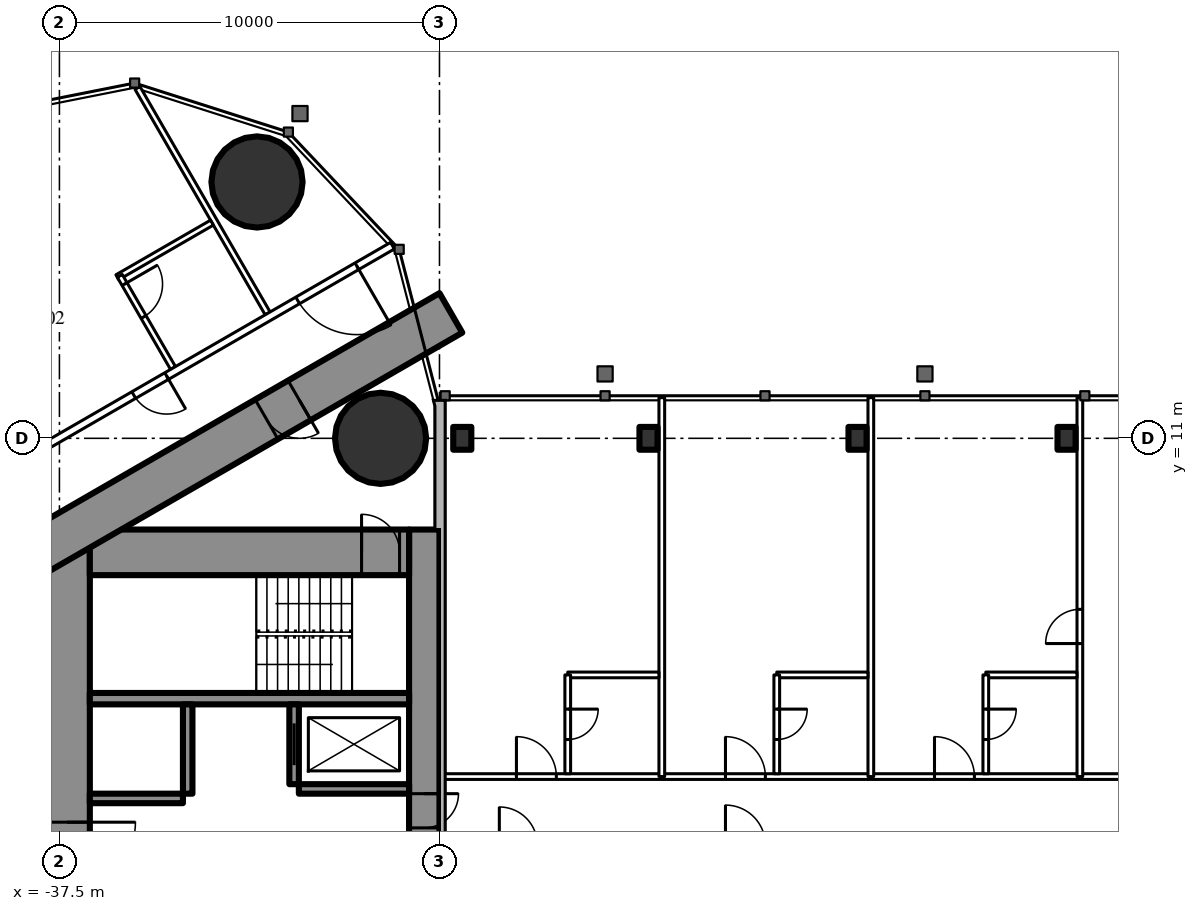
"""IFC4 building model, lengths in metres.
Left out: names, types, materials, properties, quantities, classifications, styles, units other than length and angle.
Written with IfcOpenShell. Run it as: python <this file> out.ifc"""

import sys

from ifc_helpers import new_model, si_unit, direction, frame, frame_2d, origin, origin_2d, place, context, subcontext, project, spatial, rectangle, circle, i_section, extrude, element, fill, save


model = new_model("IFC4")
c1 = context("Model", 3, precision=1e-05, world=origin(), true_north=direction((0.0, 1.0)))
c2 = subcontext(c1, "Body", "Model", "MODEL_VIEW")
j1 = project(units=[si_unit("LENGTHUNIT", "METRE"), si_unit("PLANEANGLEUNIT", "RADIAN")], contexts=[c1])
p1 = place(None, origin())
s1 = spatial("IfcSite", under=j1, at=p1, CompositionType="ELEMENT")
p2 = place(p1, origin())
s2 = spatial("IfcBuilding", under=s1, at=p2, CompositionType="ELEMENT")
p3 = place(p2, frame((0.0, 0.0, 229.7)))
s3 = spatial("IfcBuildingStorey", under=s2, at=p3, CompositionType="ELEMENT", Elevation=229.7)
for number, where, z_axis, x_axis in (
    (1, (-32.301, 17.745, 0.0), (0.0, 0.0, 1.0), (1.0, 0.0, 0.0)),
    (2, (-29.05, 11.0, 0.0), (0.0, 0.0, 1.0), (1.0, 0.0, 0.0)),
):
    element("IfcColumn", number, at=place(p3, frame(where, z_axis=z_axis, x_axis=x_axis)), inside=s3, PredefinedType="COLUMN", context=c2, shape_type="SweptSolid", body=[
        extrude(circle(Radius=1.2, at=origin_2d()), origin(), (0.0, 0.0, 1.0), 3.6),
    ])
p4 = place(p3, frame((-27.9, 8.6, 0.0), z_axis=(0.0, 0.0, 1.0), x_axis=(0.0, -1.0, 0.0)))
e3 = element("IfcWall", 3, at=p4, inside=s3, PredefinedType="SHEAR", context=c2, shape_type="SweptSolid", body=[
    extrude(rectangle(XDim=17.2, YDim=0.8, at=frame_2d((8.6, 0.0))), origin(), (0.0, 0.0, 1.0), 3.6),
])
p5 = place(p4, frame((6.95, 0.0, 0.0)))
e4 = element("IfcOpeningElement", 4, at=p5, cuts=e3, PredefinedType="OPENING", context=c2, shape_type="SweptSolid", body=[
    extrude(rectangle(XDim=0.9, YDim=2.2, at=frame_2d((0.45, 1.1))), frame((0.0, 0.41, 0.0), z_axis=(0.0, -1.0, 0.0), x_axis=(1.0, 0.0, 0.0)), (0.0, 0.0, 1.0), 0.82),
])
p6 = place(p3, frame((-37.3, 8.6, 0.0), z_axis=(0.0, 0.0, 1.0), x_axis=(0.0, -1.0, 0.0)))
e5 = element("IfcWall", 5, at=p6, inside=s3, PredefinedType="SHEAR", context=c2, shape_type="SweptSolid", body=[
    extrude(rectangle(XDim=17.2, YDim=1.2, at=frame_2d((8.6, 0.0))), origin(), (0.0, 0.0, 1.0), 3.6),
])
p7 = place(p6, frame((7.7, 0.0, 0.0)))
e6 = element("IfcOpeningElement", 6, at=p7, cuts=e5, PredefinedType="OPENING", context=c2, shape_type="SweptSolid", body=[
    extrude(rectangle(XDim=1.8, YDim=2.2, at=frame_2d((0.9, 1.1))), frame((0.0, 0.61, 0.0), z_axis=(0.0, -1.0, 0.0), x_axis=(1.0, 0.0, 0.0)), (0.0, 0.0, 1.0), 1.22),
])
p8 = place(p3, frame((-28.3, 8.0, 0.0), z_axis=(0.0, 0.0, 1.0), x_axis=(-1.0, 0.0, 0.0)))
e7 = element("IfcWall", 7, at=p8, inside=s3, PredefinedType="SHEAR", context=c2, shape_type="SweptSolid", body=[
    extrude(rectangle(XDim=8.4, YDim=1.2, at=frame_2d((4.2, 0.0))), origin(), (0.0, 0.0, 1.0), 3.6),
])
p9 = place(p8, frame((0.25, 0.0, 0.0)))
e8 = element("IfcOpeningElement", 8, at=p9, cuts=e7, PredefinedType="OPENING", context=c2, shape_type="SweptSolid", body=[
    extrude(rectangle(XDim=1.0, YDim=2.2, at=frame_2d((0.5, 1.1))), frame((0.0, 0.61, 0.0), z_axis=(0.0, -1.0, 0.0), x_axis=(1.0, 0.0, 0.0)), (0.0, 0.0, 1.0), 1.22),
])
p10 = place(p3, frame((-28.3, 4.15, 0.0), z_axis=(0.0, 0.0, 1.0), x_axis=(-1.0, 0.0, 0.0)))
e9 = element("IfcWall", 9, at=p10, inside=s3, PredefinedType="SHEAR", context=c2, shape_type="SweptSolid", body=[
    extrude(rectangle(XDim=8.4, YDim=0.3, at=frame_2d((4.2, 0.0))), origin(), (0.0, 0.0, 1.0), 3.6),
])
p11 = place(p3, frame((-31.325, 4.0, 0.0), z_axis=(0.0, 0.0, 1.0), x_axis=(0.0, -1.0, 0.0)))
e10 = element("IfcWall", 10, at=p11, inside=s3, PredefinedType="SHEAR", context=c2, shape_type="SweptSolid", body=[
    extrude(rectangle(XDim=2.1, YDim=0.25, at=frame_2d((1.05, 0.0))), origin(), (0.0, 0.0, 1.0), 3.6),
])
p12 = place(p11, frame((0.5, 0.0, 0.0)))
e11 = element("IfcOpeningElement", 11, at=p12, cuts=e10, PredefinedType="OPENING", context=c2, shape_type="SweptSolid", body=[
    extrude(rectangle(XDim=1.1, YDim=2.2, at=frame_2d((0.55, 1.1))), frame((0.0, 0.135, 0.0), z_axis=(0.0, -1.0, 0.0), x_axis=(1.0, 0.0, 0.0)), (0.0, 0.0, 1.0), 0.27),
])
p13 = place(p3, frame((-34.125, 4.0, 0.0), z_axis=(0.0, 0.0, 1.0), x_axis=(0.0, -1.0, 0.0)))
e12 = element("IfcWall", 12, at=p13, inside=s3, PredefinedType="SHEAR", context=c2, shape_type="SweptSolid", body=[
    extrude(rectangle(XDim=2.35, YDim=0.25, at=frame_2d((1.175, 0.0))), origin(), (0.0, 0.0, 1.0), 3.6),
])
p14 = place(p3, frame((-28.3, 1.775, 0.0), z_axis=(0.0, 0.0, 1.0), x_axis=(-1.0, 0.0, 0.0)))
e13 = element("IfcWall", 13, at=p14, inside=s3, PredefinedType="SHEAR", context=c2, shape_type="SweptSolid", body=[
    extrude(rectangle(XDim=2.9, YDim=0.25, at=frame_2d((1.45, 0.0))), origin(), (0.0, 0.0, 1.0), 3.6),
])
p15 = place(p3, frame((-34.25, 1.525, 0.0), z_axis=(0.0, 0.0, 1.0), x_axis=(-1.0, 0.0, 0.0)))
e14 = element("IfcWall", 14, at=p15, inside=s3, PredefinedType="SHEAR", context=c2, shape_type="SweptSolid", body=[
    extrude(rectangle(XDim=2.45, YDim=0.25, at=frame_2d((1.225, 0.0))), origin(), (0.0, 0.0, 1.0), 3.6),
])
p16 = place(p3, frame((-27.2, 14.3, 0.0), z_axis=(0.0, 0.0, 1.0), x_axis=(-0.866026593062, -0.499997940104, 0.0)))
e15 = element("IfcWall", 15, at=p16, inside=s3, PredefinedType="SHEAR", context=c2, shape_type="SweptSolid", body=[
    extrude(rectangle(XDim=28.946, YDim=1.2, at=frame_2d((14.473, 0.0))), origin(), (0.0, 0.0, 1.0), 3.6),
])
p17 = place(p16, frame((4.6, 0.0, 0.0)))
e16 = element("IfcOpeningElement", 16, at=p17, cuts=e15, PredefinedType="OPENING", context=c2, shape_type="SweptSolid", body=[
    extrude(rectangle(XDim=1.0, YDim=2.2, at=frame_2d((0.5, 1.1))), frame((0.0, 0.61, 0.0), z_axis=(0.0, -1.0, 0.0), x_axis=(1.0, 0.0, 0.0)), (0.0, 0.0, 1.0), 1.22),
])
p18 = place(p16, frame((13.395, 0.0, 0.0)))
e17 = element("IfcOpeningElement", 17, at=p18, cuts=e15, PredefinedType="OPENING", context=c2, shape_type="SweptSolid", body=[
    extrude(rectangle(XDim=1.8, YDim=2.2, at=frame_2d((0.9, 1.1))), frame((0.0, 0.61, 0.0), z_axis=(0.0, -1.0, 0.0), x_axis=(1.0, 0.0, 0.0)), (0.0, 0.0, 1.0), 1.22),
])
for number, where, z_axis, x_axis in (
    (18, (-26.9, 11.0, 0.0), (0.0, 0.0, 1.0), (1.0, 0.0, 0.0)),
    (19, (-22.0, 11.0, 0.0), (0.0, 0.0, 1.0), (1.0, 0.0, 0.0)),
    (20, (-16.5, 11.0, 0.0), (0.0, 0.0, 1.0), (1.0, 0.0, 0.0)),
    (21, (-11.0, 11.0, 0.0), (0.0, 0.0, 1.0), (1.0, 0.0, 0.0)),
):
    element("IfcColumn", number, at=place(p3, frame(where, z_axis=z_axis, x_axis=x_axis)), inside=s3, PredefinedType="COLUMN", context=c2, shape_type="SweptSolid", body=[
        extrude(i_section(OverallWidth=0.476, OverallDepth=0.6, WebThickness=0.1, FlangeThickness=0.14, FilletRadius=0.02, at=origin_2d()), origin(), (0.0, 0.0, 1.0), 3.6),
    ])
p19 = place(p3, frame((-32.022, 14.287, 0.0), z_axis=(0.0, 0.0, 1.0), x_axis=(-0.50000019414, 0.866025291697, 0.0)))
e22 = element("IfcWall", 22, at=p19, inside=s3, PredefinedType="PARTITIONING", context=c2, shape_type="SweptSolid", body=[
    extrude(rectangle(XDim=6.848, YDim=0.15, at=frame_2d((3.424, 0.0))), origin(), (0.0, 0.0, 1.0), 3.35),
])
p20 = place(p3, frame((-33.487, 16.675, 0.0), z_axis=(0.0, 0.0, 1.0), x_axis=(-0.866039941686, -0.499974818771, 0.0)))
e23 = element("IfcWall", 23, at=p20, inside=s3, PredefinedType="PARTITIONING", context=c2, shape_type="SweptSolid", body=[
    extrude(rectangle(XDim=2.875, YDim=0.15, at=frame_2d((1.438, 0.0))), origin(), (0.0, 0.0, 1.0), 3.35),
])
p21 = place(p3, frame((-34.511, 12.85, 0.0), z_axis=(0.0, 0.0, 1.0), x_axis=(-0.500011755427, 0.866018616679, 0.0)))
e24 = element("IfcWall", 24, at=p21, inside=s3, PredefinedType="PARTITIONING", context=c2, shape_type="SweptSolid", body=[
    extrude(rectangle(XDim=2.8, YDim=0.15, at=frame_2d((1.4, 0.0))), origin(), (0.0, 0.0, 1.0), 3.35),
])
p22 = place(p21, frame((1.55, 0.0, 0.0)))
e25 = element("IfcOpeningElement", 25, at=p22, cuts=e24, PredefinedType="OPENING", context=c2, shape_type="SweptSolid", body=[
    extrude(rectangle(XDim=1.0, YDim=2.2, at=frame_2d((0.5, 1.1))), frame((0.0, 0.085, 0.0), z_axis=(0.0, -1.0, 0.0), x_axis=(1.0, 0.0, 0.0)), (0.0, 0.0, 1.0), 0.17),
])
p23 = place(p3, frame((-28.737, 16.068, 0.0), z_axis=(0.0, 0.0, 1.0), x_axis=(-0.866023901326, -0.500002602325, 0.0)))
e26 = element("IfcWall", 26, at=p23, inside=s3, PredefinedType="PARTITIONING", context=c2, shape_type="SweptSolid", body=[
    extrude(rectangle(XDim=20.192, YDim=0.2, at=frame_2d((10.096, 0.0))), origin(), (0.0, 0.0, 1.0), 3.35),
])
p24 = place(p23, frame((1.08, 0.0, 0.0)))
e27 = element("IfcOpeningElement", 27, at=p24, cuts=e26, PredefinedType="OPENING", context=c2, shape_type="SweptSolid", body=[
    extrude(rectangle(XDim=1.8, YDim=2.04, at=frame_2d((0.9, 1.02))), frame((0.0, 0.11, 0.0), z_axis=(0.0, -1.0, 0.0), x_axis=(1.0, 0.0, 0.0)), (0.0, 0.0, 1.0), 0.22),
])
p25 = place(p23, frame((6.86, 0.0, 0.0)))
e28 = element("IfcOpeningElement", 28, at=p25, cuts=e26, PredefinedType="OPENING", context=c2, shape_type="SweptSolid", body=[
    extrude(rectangle(XDim=1.0, YDim=2.2, at=frame_2d((0.5, 1.1))), frame((0.0, 0.11, 0.0), z_axis=(0.0, -1.0, 0.0), x_axis=(1.0, 0.0, 0.0)), (0.0, 0.0, 1.0), 0.22),
])
p26 = place(p23, frame((18.867, 0.0, 0.0)))
e29 = element("IfcOpeningElement", 29, at=p26, cuts=e26, PredefinedType="OPENING", context=c2, shape_type="SweptSolid", body=[
    extrude(rectangle(XDim=0.95, YDim=2.2, at=frame_2d((0.475, 1.1))), frame((0.0, 0.11, 0.0), z_axis=(0.0, -1.0, 0.0), x_axis=(1.0, 0.0, 0.0)), (0.0, 0.0, 1.0), 0.22),
])
p27 = place(p3, frame((-27.5, 2.1, 0.0), z_axis=(0.0, 0.0, 1.0), x_axis=(1.0, 0.0, 0.0)))
e30 = element("IfcWall", 30, at=p27, inside=s3, PredefinedType="PARTITIONING", context=c2, shape_type="SweptSolid", body=[
    extrude(rectangle(XDim=22.35, YDim=0.15, at=frame_2d((11.175, 0.0))), origin(), (0.0, 0.0, 1.0), 3.4),
])
p28 = place(p27, frame((2.025, 0.0, 0.0)))
e31 = element("IfcOpeningElement", 31, at=p28, cuts=e30, PredefinedType="OPENING", context=c2, shape_type="SweptSolid", body=[
    extrude(rectangle(XDim=1.05, YDim=2.4, at=frame_2d((0.525, 1.2))), frame((0.0, 0.085, 0.0), z_axis=(0.0, -1.0, 0.0), x_axis=(1.0, 0.0, 0.0)), (0.0, 0.0, 1.0), 0.17),
])
p29 = place(p27, frame((7.525, 0.0, 0.0)))
e32 = element("IfcOpeningElement", 32, at=p29, cuts=e30, PredefinedType="OPENING", context=c2, shape_type="SweptSolid", body=[
    extrude(rectangle(XDim=1.05, YDim=2.4, at=frame_2d((0.525, 1.2))), frame((0.0, 0.085, 0.0), z_axis=(0.0, -1.0, 0.0), x_axis=(1.0, 0.0, 0.0)), (0.0, 0.0, 1.0), 0.17),
])
p30 = place(p27, frame((13.025, 0.0, 0.0)))
e33 = element("IfcOpeningElement", 33, at=p30, cuts=e30, PredefinedType="OPENING", context=c2, shape_type="SweptSolid", body=[
    extrude(rectangle(XDim=1.05, YDim=2.4, at=frame_2d((0.525, 1.2))), frame((0.0, 0.085, 0.0), z_axis=(0.0, -1.0, 0.0), x_axis=(1.0, 0.0, 0.0)), (0.0, 0.0, 1.0), 0.17),
])
p31 = place(p27, frame((18.525, 0.0, 0.0)))
e34 = element("IfcOpeningElement", 34, at=p31, cuts=e30, PredefinedType="OPENING", context=c2, shape_type="SweptSolid", body=[
    extrude(rectangle(XDim=1.05, YDim=2.4, at=frame_2d((0.525, 1.2))), frame((0.0, 0.085, 0.0), z_axis=(0.0, -1.0, 0.0), x_axis=(1.0, 0.0, 0.0)), (0.0, 0.0, 1.0), 0.17),
])
for number, where, z_axis, x_axis in (
    (35, (-21.65, 2.1, 0.0), (0.0, 0.0, 1.0), (0.0, 1.0, 0.0)),
    (36, (-16.15, 2.1, 0.0), (0.0, 0.0, 1.0), (0.0, 1.0, 0.0)),
):
    element("IfcWall", number, at=place(p3, frame(where, z_axis=z_axis, x_axis=x_axis)), inside=s3, PredefinedType="PARTITIONING", context=c2, shape_type="SweptSolid", body=[
        extrude(rectangle(XDim=9.97, YDim=0.15, at=frame_2d((4.985, 0.0))), origin(), (0.0, 0.0, 1.0), 3.4),
    ])
p32 = place(p3, frame((-10.65, 2.1, 0.0), z_axis=(0.0, 0.0, 1.0), x_axis=(0.0, 1.0, 0.0)))
e37 = element("IfcWall", 37, at=p32, inside=s3, PredefinedType="PARTITIONING", context=c2, shape_type="SweptSolid", body=[
    extrude(rectangle(XDim=9.97, YDim=0.15, at=frame_2d((4.985, 0.0))), origin(), (0.0, 0.0, 1.0), 3.4),
])
p33 = place(p32, frame((3.5, 0.0, 0.0)))
e38 = element("IfcOpeningElement", 38, at=p33, cuts=e37, PredefinedType="OPENING", context=c2, shape_type="SweptSolid", body=[
    extrude(rectangle(XDim=0.9, YDim=2.2, at=frame_2d((0.45, 1.1))), frame((0.0, 0.085, 0.0), z_axis=(0.0, -1.0, 0.0), x_axis=(1.0, 0.0, 0.0)), (0.0, 0.0, 1.0), 0.17),
])
p34 = place(p3, frame((-24.125, 4.775, 0.0), z_axis=(0.0, 0.0, 1.0), x_axis=(1.0, 0.0, 0.0)))
e39 = element("IfcWall", 39, at=p34, inside=s3, PredefinedType="PARTITIONING", context=c2, shape_type="SweptSolid", body=[
    extrude(rectangle(XDim=2.4, YDim=0.15, at=frame_2d((1.2, 0.0))), origin(), (0.0, 0.0, 1.0), 3.4),
])
p35 = place(p3, frame((-24.125, 2.175, 0.0), z_axis=(0.0, 0.0, 1.0), x_axis=(0.0, 1.0, 0.0)))
e40 = element("IfcWall", 40, at=p35, inside=s3, PredefinedType="PARTITIONING", context=c2, shape_type="SweptSolid", body=[
    extrude(rectangle(XDim=2.6, YDim=0.15, at=frame_2d((1.3, 0.0))), origin(), (0.0, 0.0, 1.0), 3.4),
])
p36 = place(p35, frame((0.9, 0.0, 0.0)))
e41 = element("IfcOpeningElement", 41, at=p36, cuts=e40, PredefinedType="OPENING", context=c2, shape_type="SweptSolid", body=[
    extrude(rectangle(XDim=0.8, YDim=2.2, at=frame_2d((0.4, 1.1))), frame((0.0, 0.085, 0.0), z_axis=(0.0, -1.0, 0.0), x_axis=(1.0, 0.0, 0.0)), (0.0, 0.0, 1.0), 0.17),
])
p37 = place(p3, frame((-18.625, 4.775, 0.0), z_axis=(0.0, 0.0, 1.0), x_axis=(1.0, 0.0, 0.0)))
e42 = element("IfcWall", 42, at=p37, inside=s3, PredefinedType="PARTITIONING", context=c2, shape_type="SweptSolid", body=[
    extrude(rectangle(XDim=2.4, YDim=0.15, at=frame_2d((1.2, 0.0))), origin(), (0.0, 0.0, 1.0), 3.4),
])
p38 = place(p3, frame((-18.625, 2.175, 0.0), z_axis=(0.0, 0.0, 1.0), x_axis=(0.0, 1.0, 0.0)))
e43 = element("IfcWall", 43, at=p38, inside=s3, PredefinedType="PARTITIONING", context=c2, shape_type="SweptSolid", body=[
    extrude(rectangle(XDim=2.6, YDim=0.15, at=frame_2d((1.3, 0.0))), origin(), (0.0, 0.0, 1.0), 3.4),
])
p39 = place(p38, frame((0.9, 0.0, 0.0)))
e44 = element("IfcOpeningElement", 44, at=p39, cuts=e43, PredefinedType="OPENING", context=c2, shape_type="SweptSolid", body=[
    extrude(rectangle(XDim=0.8, YDim=2.2, at=frame_2d((0.4, 1.1))), frame((0.0, 0.085, 0.0), z_axis=(0.0, -1.0, 0.0), x_axis=(1.0, 0.0, 0.0)), (0.0, 0.0, 1.0), 0.17),
])
p40 = place(p3, frame((-13.125, 4.775, 0.0), z_axis=(0.0, 0.0, 1.0), x_axis=(1.0, 0.0, 0.0)))
e45 = element("IfcWall", 45, at=p40, inside=s3, PredefinedType="PARTITIONING", context=c2, shape_type="SweptSolid", body=[
    extrude(rectangle(XDim=2.4, YDim=0.15, at=frame_2d((1.2, 0.0))), origin(), (0.0, 0.0, 1.0), 3.4),
])
p41 = place(p3, frame((-13.125, 2.175, 0.0), z_axis=(0.0, 0.0, 1.0), x_axis=(0.0, 1.0, 0.0)))
e46 = element("IfcWall", 46, at=p41, inside=s3, PredefinedType="PARTITIONING", context=c2, shape_type="SweptSolid", body=[
    extrude(rectangle(XDim=2.6, YDim=0.15, at=frame_2d((1.3, 0.0))), origin(), (0.0, 0.0, 1.0), 3.4),
])
p42 = place(p41, frame((0.9, 0.0, 0.0)))
e47 = element("IfcOpeningElement", 47, at=p42, cuts=e46, PredefinedType="OPENING", context=c2, shape_type="SweptSolid", body=[
    extrude(rectangle(XDim=0.8, YDim=2.2, at=frame_2d((0.4, 1.1))), frame((0.0, 0.085, 0.0), z_axis=(0.0, -1.0, 0.0), x_axis=(1.0, 0.0, 0.0)), (0.0, 0.0, 1.0), 0.17),
])
p43 = place(p24, origin())
e48 = element("IfcDoor", 48, at=p43, inside=s3, OperationType="DOUBLE_DOOR_SINGLE_SWING", PredefinedType="DOOR", context=c2, shape_type="SweptSolid", body=[
    extrude(rectangle(XDim=1.8, YDim=2.04, at=frame_2d((0.9, 1.02))), frame((0.0, 0.025, 0.0), z_axis=(0.0, -1.0, 0.0), x_axis=(1.0, 0.0, 0.0)), (0.0, 0.0, 1.0), 0.05),
])
fill(e27, e48)
p44 = place(p22, origin())
e49 = element("IfcDoor", 49, at=p44, inside=s3, OperationType="SINGLE_SWING_RIGHT", PredefinedType="DOOR", context=c2, shape_type="SweptSolid", body=[
    extrude(rectangle(XDim=1.0, YDim=2.2, at=frame_2d((0.5, 1.1))), frame((0.0, 0.025, 0.0), z_axis=(0.0, -1.0, 0.0), x_axis=(1.0, 0.0, 0.0)), (0.0, 0.0, 1.0), 0.05),
])
fill(e25, e49)
p45 = place(p25, origin())
e50 = element("IfcDoor", 50, at=p45, inside=s3, OperationType="SINGLE_SWING_LEFT", PredefinedType="DOOR", context=c2, shape_type="SweptSolid", body=[
    extrude(rectangle(XDim=1.0, YDim=2.2, at=frame_2d((0.5, 1.1))), frame((0.0, 0.025, 0.0), z_axis=(0.0, -1.0, 0.0), x_axis=(1.0, 0.0, 0.0)), (0.0, 0.0, 1.0), 0.05),
])
fill(e28, e50)
p46 = place(p17, origin())
e51 = element("IfcDoor", 51, at=p46, inside=s3, OperationType="SINGLE_SWING_LEFT", PredefinedType="DOOR", context=c2, shape_type="SweptSolid", body=[
    extrude(rectangle(XDim=1.0, YDim=2.2, at=frame_2d((0.5, 1.1))), frame((0.0, 0.025, 0.0), z_axis=(0.0, -1.0, 0.0), x_axis=(1.0, 0.0, 0.0)), (0.0, 0.0, 1.0), 0.05),
])
fill(e16, e51)
p47 = place(p7, origin())
e52 = element("IfcDoor", 52, at=p47, inside=s3, OperationType="DOUBLE_DOOR_SINGLE_SWING", PredefinedType="DOOR", context=c2, shape_type="SweptSolid", body=[
    extrude(rectangle(XDim=1.8, YDim=2.2, at=frame_2d((0.9, 1.1))), frame((0.0, 0.025, 0.0), z_axis=(0.0, -1.0, 0.0), x_axis=(1.0, 0.0, 0.0)), (0.0, 0.0, 1.0), 0.05),
])
fill(e6, e52)
p48 = place(p9, origin())
e53 = element("IfcDoor", 53, at=p48, inside=s3, OperationType="SINGLE_SWING_RIGHT", PredefinedType="DOOR", context=c2, shape_type="SweptSolid", body=[
    extrude(rectangle(XDim=1.0, YDim=2.2, at=frame_2d((0.5, 1.1))), frame((0.0, 0.025, 0.0), z_axis=(0.0, -1.0, 0.0), x_axis=(1.0, 0.0, 0.0)), (0.0, 0.0, 1.0), 0.05),
])
fill(e8, e53)
p49 = place(p5, origin())
e54 = element("IfcDoor", 54, at=p49, inside=s3, OperationType="SINGLE_SWING_LEFT", PredefinedType="DOOR", context=c2, shape_type="SweptSolid", body=[
    extrude(rectangle(XDim=0.9, YDim=2.2, at=frame_2d((0.45, 1.1))), frame((0.0, 0.025, 0.0), z_axis=(0.0, -1.0, 0.0), x_axis=(1.0, 0.0, 0.0)), (0.0, 0.0, 1.0), 0.05),
])
fill(e4, e54)
p50 = place(p36, origin())
e55 = element("IfcDoor", 55, at=p50, inside=s3, OperationType="SINGLE_SWING_RIGHT", PredefinedType="DOOR", context=c2, shape_type="SweptSolid", body=[
    extrude(rectangle(XDim=0.8, YDim=2.2, at=frame_2d((0.4, 1.1))), frame((0.0, 0.025, 0.0), z_axis=(0.0, -1.0, 0.0), x_axis=(1.0, 0.0, 0.0)), (0.0, 0.0, 1.0), 0.05),
])
fill(e41, e55)
p51 = place(p28, origin())
e56 = element("IfcDoor", 56, at=p51, inside=s3, OperationType="SINGLE_SWING_LEFT", PredefinedType="DOOR", context=c2, shape_type="SweptSolid", body=[
    extrude(rectangle(XDim=1.05, YDim=2.4, at=frame_2d((0.525, 1.2))), frame((0.0, 0.025, 0.0), z_axis=(0.0, -1.0, 0.0), x_axis=(1.0, 0.0, 0.0)), (0.0, 0.0, 1.0), 0.05),
])
fill(e31, e56)
p52 = place(p39, origin())
e57 = element("IfcDoor", 57, at=p52, inside=s3, OperationType="SINGLE_SWING_RIGHT", PredefinedType="DOOR", context=c2, shape_type="SweptSolid", body=[
    extrude(rectangle(XDim=0.8, YDim=2.2, at=frame_2d((0.4, 1.1))), frame((0.0, 0.025, 0.0), z_axis=(0.0, -1.0, 0.0), x_axis=(1.0, 0.0, 0.0)), (0.0, 0.0, 1.0), 0.05),
])
fill(e44, e57)
p53 = place(p29, origin())
e58 = element("IfcDoor", 58, at=p53, inside=s3, OperationType="SINGLE_SWING_LEFT", PredefinedType="DOOR", context=c2, shape_type="SweptSolid", body=[
    extrude(rectangle(XDim=1.05, YDim=2.4, at=frame_2d((0.525, 1.2))), frame((0.0, 0.025, 0.0), z_axis=(0.0, -1.0, 0.0), x_axis=(1.0, 0.0, 0.0)), (0.0, 0.0, 1.0), 0.05),
])
fill(e32, e58)
p54 = place(p42, origin())
e59 = element("IfcDoor", 59, at=p54, inside=s3, OperationType="SINGLE_SWING_RIGHT", PredefinedType="DOOR", context=c2, shape_type="SweptSolid", body=[
    extrude(rectangle(XDim=0.8, YDim=2.2, at=frame_2d((0.4, 1.1))), frame((0.0, 0.025, 0.0), z_axis=(0.0, -1.0, 0.0), x_axis=(1.0, 0.0, 0.0)), (0.0, 0.0, 1.0), 0.05),
])
fill(e47, e59)
p55 = place(p30, origin())
e60 = element("IfcDoor", 60, at=p55, inside=s3, OperationType="SINGLE_SWING_LEFT", PredefinedType="DOOR", context=c2, shape_type="SweptSolid", body=[
    extrude(rectangle(XDim=1.05, YDim=2.4, at=frame_2d((0.525, 1.2))), frame((0.0, 0.025, 0.0), z_axis=(0.0, -1.0, 0.0), x_axis=(1.0, 0.0, 0.0)), (0.0, 0.0, 1.0), 0.05),
])
fill(e33, e60)
p56 = place(p33, origin())
e61 = element("IfcDoor", 61, at=p56, inside=s3, OperationType="SINGLE_SWING_LEFT", PredefinedType="DOOR", context=c2, shape_type="SweptSolid", body=[
    extrude(rectangle(XDim=0.9, YDim=2.2, at=frame_2d((0.45, 1.1))), frame((0.0, 0.025, 0.0), z_axis=(0.0, -1.0, 0.0), x_axis=(1.0, 0.0, 0.0)), (0.0, 0.0, 1.0), 0.05),
])
fill(e38, e61)
p57 = place(p12, origin())
e62 = element("IfcDoor", 62, at=p57, inside=s3, OperationType="SLIDING_TO_LEFT", PredefinedType="USERDEFINED", context=c2, shape_type="SweptSolid", body=[
    extrude(rectangle(XDim=1.1, YDim=2.2, at=frame_2d((0.55, 1.1))), frame((0.0, 0.025, 0.0), z_axis=(0.0, -1.0, 0.0), x_axis=(1.0, 0.0, 0.0)), (0.0, 0.0, 1.0), 0.05),
])
fill(e11, e62)
save(model, sys.argv[1])
